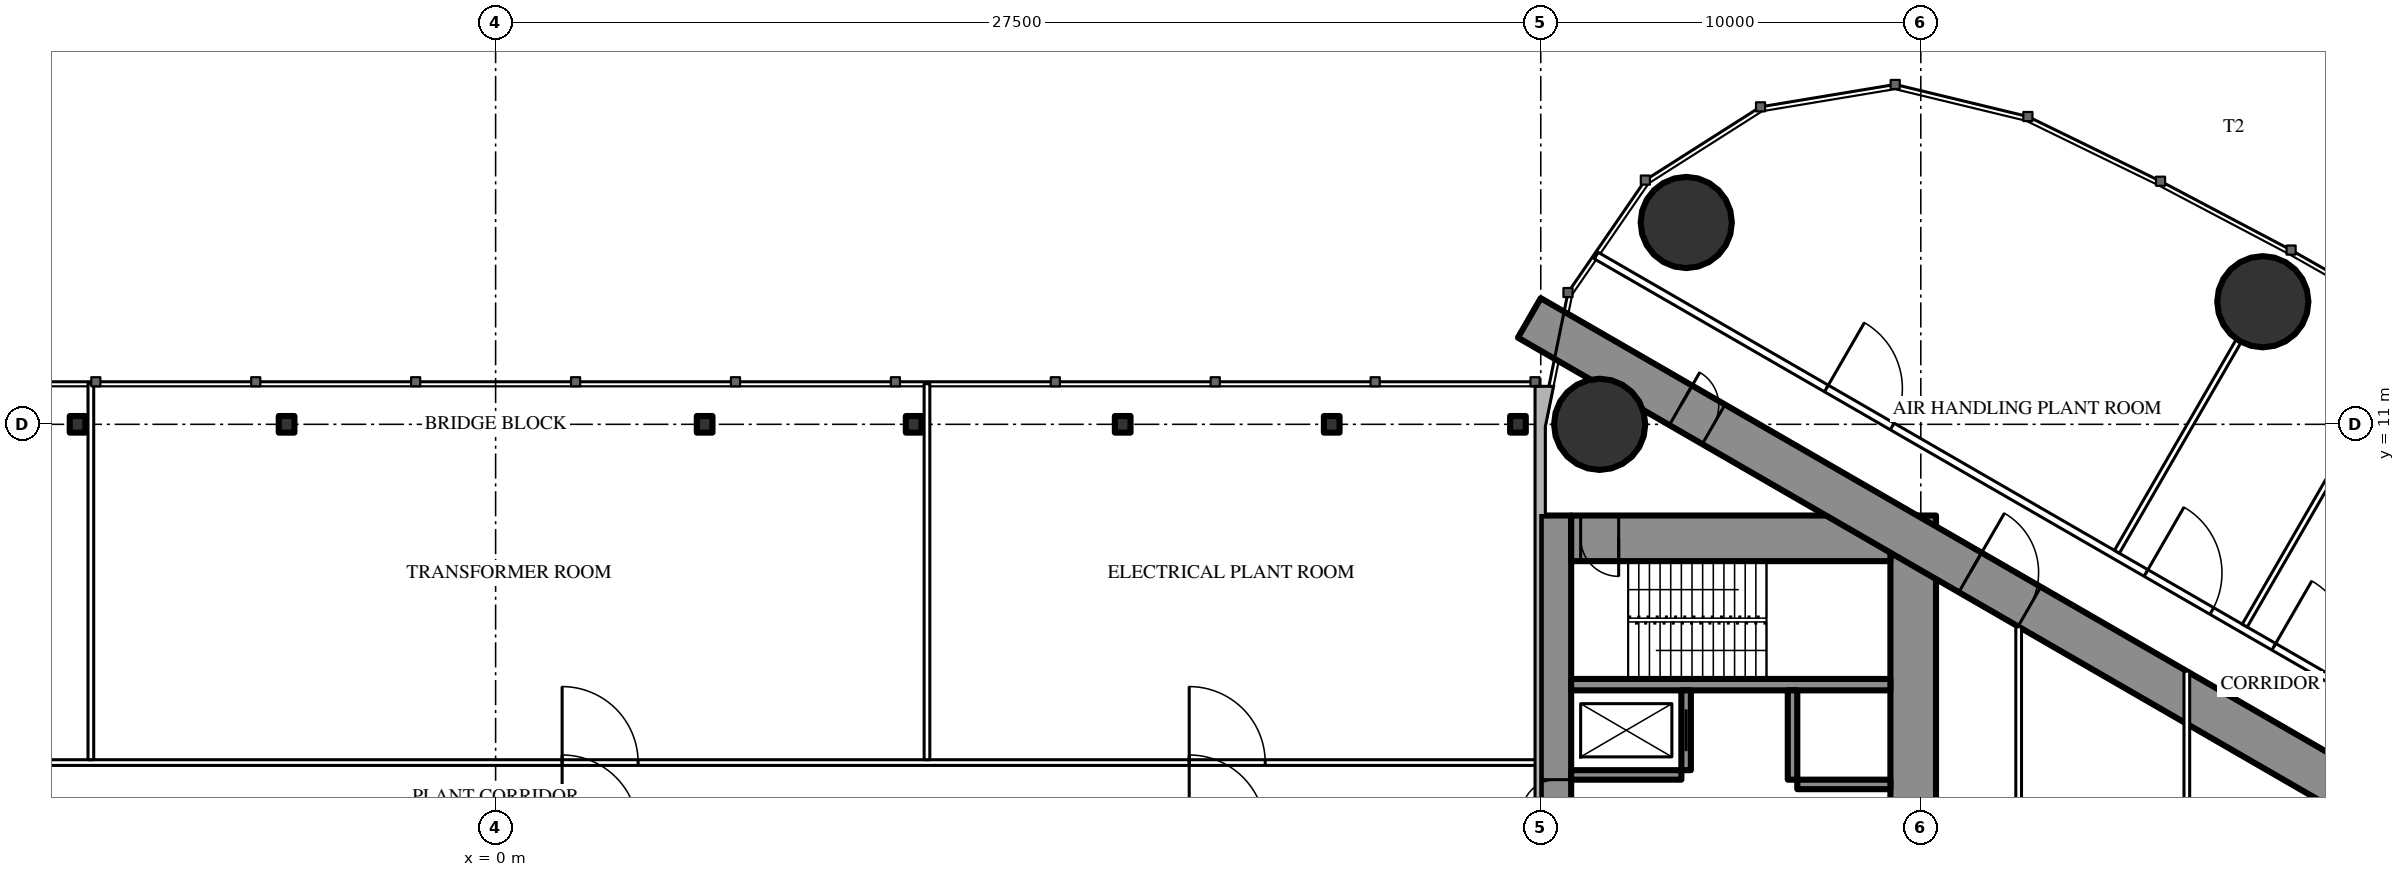
"""IFC4 building model, lengths in metres.
Left out: names, types, materials, properties, quantities, classifications, styles, units other than length and angle.
Written with IfcOpenShell. Run it as: python <this file> out.ifc"""

import sys

from ifc_helpers import new_model, si_unit, direction, frame, frame_2d, origin, origin_2d, place, context, subcontext, project, spatial, rectangle, circle, i_section, extrude, element, fill, save


model = new_model("IFC4")
c1 = context("Model", 3, precision=1e-05, world=origin(), true_north=direction((0.0, 1.0)))
c2 = subcontext(c1, "Body", "Model", "MODEL_VIEW")
j1 = project(units=[si_unit("LENGTHUNIT", "METRE"), si_unit("PLANEANGLEUNIT", "RADIAN")], contexts=[c1])
p1 = place(None, origin())
s1 = spatial("IfcSite", under=j1, at=p1, CompositionType="ELEMENT")
p2 = place(p1, origin())
s2 = spatial("IfcBuilding", under=s1, at=p2, CompositionType="ELEMENT")
p3 = place(p2, frame((0.0, 0.0, 263.3)))
s3 = spatial("IfcBuildingStorey", under=s2, at=p3, CompositionType="ELEMENT", Elevation=263.3)
for number, where, z_axis, x_axis in (
    (1, (31.328, 16.311, 0.0), (0.0, 0.0, 1.0), (1.0, 0.0, 0.0)),
    (2, (29.05, 11.0, 0.0), (0.0, 0.0, 1.0), (1.0, 0.0, 0.0)),
    (3, (46.499, 14.226, 0.0), (0.0, 0.0, 1.0), (1.0, 0.0, 0.0)),
):
    element("IfcColumn", number, at=place(p3, frame(where, z_axis=z_axis, x_axis=x_axis)), inside=s3, PredefinedType="COLUMN", context=c2, shape_type="SweptSolid", body=[
        extrude(circle(Radius=1.2, at=origin_2d()), origin(), (0.0, 0.0, 1.0), 5.0),
    ])
p4 = place(p3, frame((27.9, -8.6, 0.0), z_axis=(0.0, 0.0, 1.0), x_axis=(0.0, 1.0, 0.0)))
e4 = element("IfcWall", 4, at=p4, inside=s3, PredefinedType="SHEAR", context=c2, shape_type="SweptSolid", body=[
    extrude(rectangle(XDim=17.2, YDim=0.8, at=frame_2d((8.6, 0.0))), origin(), (0.0, 0.0, 1.0), 5.0),
])
p5 = place(p4, frame((9.35, 0.0, 0.0)))
e5 = element("IfcOpeningElement", 5, at=p5, cuts=e4, PredefinedType="OPENING", context=c2, shape_type="SweptSolid", body=[
    extrude(rectangle(XDim=0.9, YDim=2.2, at=frame_2d((0.45, 1.1))), frame((0.0, 0.41, 0.0), z_axis=(0.0, -1.0, 0.0), x_axis=(1.0, 0.0, 0.0)), (0.0, 0.0, 1.0), 0.82),
])
p6 = place(p3, frame((37.3, -8.6, 0.0), z_axis=(0.0, 0.0, 1.0), x_axis=(0.0, 1.0, 0.0)))
e6 = element("IfcWall", 6, at=p6, inside=s3, PredefinedType="SHEAR", context=c2, shape_type="SweptSolid", body=[
    extrude(rectangle(XDim=17.2, YDim=1.2, at=frame_2d((8.6, 0.0))), origin(), (0.0, 0.0, 1.0), 5.0),
])
p7 = place(p6, frame((7.7, 0.0, 0.0)))
e7 = element("IfcOpeningElement", 7, at=p7, cuts=e6, PredefinedType="OPENING", context=c2, shape_type="SweptSolid", body=[
    extrude(rectangle(XDim=1.8, YDim=2.2, at=frame_2d((0.9, 1.1))), frame((0.0, 0.61, 0.0), z_axis=(0.0, -1.0, 0.0), x_axis=(1.0, 0.0, 0.0)), (0.0, 0.0, 1.0), 1.22),
])
p8 = place(p3, frame((28.3, 8.0, 0.0), z_axis=(0.0, 0.0, 1.0), x_axis=(1.0, 0.0, 0.0)))
e8 = element("IfcWall", 8, at=p8, inside=s3, PredefinedType="SHEAR", context=c2, shape_type="SweptSolid", body=[
    extrude(rectangle(XDim=8.4, YDim=1.2, at=frame_2d((4.2, 0.0))), origin(), (0.0, 0.0, 1.0), 5.0),
])
p9 = place(p8, frame((0.25, 0.0, 0.0)))
e9 = element("IfcOpeningElement", 9, at=p9, cuts=e8, PredefinedType="OPENING", context=c2, shape_type="SweptSolid", body=[
    extrude(rectangle(XDim=1.0, YDim=2.2, at=frame_2d((0.5, 1.1))), frame((0.0, 0.61, 0.0), z_axis=(0.0, -1.0, 0.0), x_axis=(1.0, 0.0, 0.0)), (0.0, 0.0, 1.0), 1.22),
])
p10 = place(p3, frame((28.3, 4.15, 0.0), z_axis=(0.0, 0.0, 1.0), x_axis=(1.0, 0.0, 0.0)))
e10 = element("IfcWall", 10, at=p10, inside=s3, PredefinedType="SHEAR", context=c2, shape_type="SweptSolid", body=[
    extrude(rectangle(XDim=8.4, YDim=0.3, at=frame_2d((4.2, 0.0))), origin(), (0.0, 0.0, 1.0), 5.0),
])
p11 = place(p3, frame((31.325, 1.9, 0.0), z_axis=(0.0, 0.0, 1.0), x_axis=(0.0, 1.0, 0.0)))
e11 = element("IfcWall", 11, at=p11, inside=s3, PredefinedType="SHEAR", context=c2, shape_type="SweptSolid", body=[
    extrude(rectangle(XDim=2.1, YDim=0.25, at=frame_2d((1.05, 0.0))), origin(), (0.0, 0.0, 1.0), 5.0),
])
p12 = place(p11, frame((0.5, 0.0, 0.0)))
e12 = element("IfcOpeningElement", 12, at=p12, cuts=e11, PredefinedType="OPENING", context=c2, shape_type="SweptSolid", body=[
    extrude(rectangle(XDim=1.1, YDim=2.2, at=frame_2d((0.55, 1.1))), frame((0.0, 0.135, 0.0), z_axis=(0.0, -1.0, 0.0), x_axis=(1.0, 0.0, 0.0)), (0.0, 0.0, 1.0), 0.27),
])
p13 = place(p3, frame((34.125, 1.65, 0.0), z_axis=(0.0, 0.0, 1.0), x_axis=(0.0, 1.0, 0.0)))
e13 = element("IfcWall", 13, at=p13, inside=s3, PredefinedType="SHEAR", context=c2, shape_type="SweptSolid", body=[
    extrude(rectangle(XDim=2.35, YDim=0.25, at=frame_2d((1.175, 0.0))), origin(), (0.0, 0.0, 1.0), 5.0),
])
p14 = place(p3, frame((28.3, 1.775, 0.0), z_axis=(0.0, 0.0, 1.0), x_axis=(1.0, 0.0, 0.0)))
e14 = element("IfcWall", 14, at=p14, inside=s3, PredefinedType="SHEAR", context=c2, shape_type="SweptSolid", body=[
    extrude(rectangle(XDim=2.9, YDim=0.25, at=frame_2d((1.45, 0.0))), origin(), (0.0, 0.0, 1.0), 5.0),
])
p15 = place(p3, frame((34.25, 1.525, 0.0), z_axis=(0.0, 0.0, 1.0), x_axis=(1.0, 0.0, 0.0)))
e15 = element("IfcWall", 15, at=p15, inside=s3, PredefinedType="SHEAR", context=c2, shape_type="SweptSolid", body=[
    extrude(rectangle(XDim=2.45, YDim=0.25, at=frame_2d((1.225, 0.0))), origin(), (0.0, 0.0, 1.0), 5.0),
])
p16 = place(p3, frame((27.2, 13.8, 0.0), z_axis=(0.0, 0.0, 1.0), x_axis=(0.866024515034, -0.500001539357, 0.0)))
e16 = element("IfcWall", 16, at=p16, inside=s3, PredefinedType="SHEAR", context=c2, shape_type="SweptSolid", body=[
    extrude(rectangle(XDim=26.907, YDim=1.2, at=frame_2d((13.454, 0.0))), origin(), (0.0, 0.0, 1.0), 5.0),
])
p17 = place(p16, frame((4.6, 0.0, 0.0)))
e17 = element("IfcOpeningElement", 17, at=p17, cuts=e16, PredefinedType="OPENING", context=c2, shape_type="SweptSolid", body=[
    extrude(rectangle(XDim=1.0, YDim=2.2, at=frame_2d((0.5, 1.1))), frame((0.0, 0.61, 0.0), z_axis=(0.0, -1.0, 0.0), x_axis=(1.0, 0.0, 0.0)), (0.0, 0.0, 1.0), 1.22),
])
p18 = place(p16, frame((13.395, 0.0, 0.0)))
e18 = element("IfcOpeningElement", 18, at=p18, cuts=e16, PredefinedType="OPENING", context=c2, shape_type="SweptSolid", body=[
    extrude(rectangle(XDim=1.8, YDim=2.2, at=frame_2d((0.9, 1.1))), frame((0.0, 0.61, 0.0), z_axis=(0.0, -1.0, 0.0), x_axis=(1.0, 0.0, 0.0)), (0.0, 0.0, 1.0), 1.22),
])
for number, where, z_axis, x_axis in (
    (19, (-11.0, 11.0, 0.0), (0.0, 0.0, 1.0), (1.0, 0.0, 0.0)),
    (20, (-5.5, 11.0, 0.0), (0.0, 0.0, 1.0), (1.0, 0.0, 0.0)),
    (21, (0.0, 11.0, 0.0), (0.0, 0.0, 1.0), (1.0, 0.0, 0.0)),
    (22, (5.5, 11.0, 0.0), (0.0, 0.0, 1.0), (1.0, 0.0, 0.0)),
    (23, (11.0, 11.0, 0.0), (0.0, 0.0, 1.0), (1.0, 0.0, 0.0)),
    (24, (16.5, 11.0, 0.0), (0.0, 0.0, 1.0), (1.0, 0.0, 0.0)),
    (25, (22.0, 11.0, 0.0), (0.0, 0.0, 1.0), (1.0, 0.0, 0.0)),
    (26, (26.9, 11.0, 0.0), (0.0, 0.0, 1.0), (1.0, 0.0, 0.0)),
):
    element("IfcColumn", number, at=place(p3, frame(where, z_axis=z_axis, x_axis=x_axis)), inside=s3, PredefinedType="COLUMN", context=c2, shape_type="SweptSolid", body=[
        extrude(i_section(OverallWidth=0.412, OverallDepth=0.437, WebThickness=0.036, FlangeThickness=0.058, FilletRadius=0.015, at=origin_2d()), origin(), (0.0, 0.0, 1.0), 5.0),
    ])
p19 = place(p3, frame((28.959, 15.44, 0.0), z_axis=(0.0, 0.0, 1.0), x_axis=(0.866027378611, -0.499996579484, 0.0)))
e27 = element("IfcWall", 27, at=p19, inside=s3, PredefinedType="PARTITIONING", context=c2, shape_type="SweptSolid", body=[
    extrude(rectangle(XDim=30.76, YDim=0.2, at=frame_2d((15.38, 0.0))), origin(), (0.0, 0.0, 1.0), 4.75),
])
p20 = place(p19, frame((26.032, 0.0, 0.0)))
e28 = element("IfcOpeningElement", 28, at=p20, cuts=e27, PredefinedType="OPENING", context=c2, shape_type="SweptSolid", body=[
    extrude(rectangle(XDim=2.0, YDim=2.4, at=frame_2d((1.0, 1.2))), frame((0.0, 0.11, 0.0), z_axis=(0.0, -1.0, 0.0), x_axis=(1.0, 0.0, 0.0)), (0.0, 0.0, 1.0), 0.22),
])
p21 = place(p19, frame((20.587, 0.0, 0.0)))
e29 = element("IfcOpeningElement", 29, at=p21, cuts=e27, PredefinedType="OPENING", context=c2, shape_type="SweptSolid", body=[
    extrude(rectangle(XDim=2.0, YDim=2.4, at=frame_2d((1.0, 1.2))), frame((0.0, 0.11, 0.0), z_axis=(0.0, -1.0, 0.0), x_axis=(1.0, 0.0, 0.0)), (0.0, 0.0, 1.0), 0.22),
])
p22 = place(p19, frame((16.704, 0.0, 0.0)))
e30 = element("IfcOpeningElement", 30, at=p22, cuts=e27, PredefinedType="OPENING", context=c2, shape_type="SweptSolid", body=[
    extrude(rectangle(XDim=2.0, YDim=2.4, at=frame_2d((1.0, 1.2))), frame((0.0, 0.11, 0.0), z_axis=(0.0, -1.0, 0.0), x_axis=(1.0, 0.0, 0.0)), (0.0, 0.0, 1.0), 0.22),
])
p23 = place(p19, frame((6.994, 0.0, 0.0)))
e31 = element("IfcOpeningElement", 31, at=p23, cuts=e27, PredefinedType="OPENING", context=c2, shape_type="SweptSolid", body=[
    extrude(rectangle(XDim=2.0, YDim=2.4, at=frame_2d((1.0, 1.2))), frame((0.0, 0.11, 0.0), z_axis=(0.0, -1.0, 0.0), x_axis=(1.0, 0.0, 0.0)), (0.0, 0.0, 1.0), 0.22),
])
p24 = place(p3, frame((42.66, 7.646, 0.0), z_axis=(0.0, 0.0, 1.0), x_axis=(0.499996592859, 0.866027370889, 0.0)))
e32 = element("IfcWall", 32, at=p24, inside=s3, PredefinedType="PARTITIONING", context=c2, shape_type="SweptSolid", body=[
    extrude(rectangle(XDim=6.398, YDim=0.15, at=frame_2d((3.199, 0.0))), origin(), (0.0, 0.0, 1.0), 3.85),
])
p25 = place(p3, frame((46.023, 5.704, 0.0), z_axis=(0.0, 0.0, 1.0), x_axis=(0.499984478165, 0.866034365135, 0.0)))
e33 = element("IfcWall", 33, at=p25, inside=s3, PredefinedType="PARTITIONING", context=c2, shape_type="SweptSolid", body=[
    extrude(rectangle(XDim=6.426, YDim=0.15, at=frame_2d((3.213, 0.0))), origin(), (0.0, 0.0, 1.0), 3.85),
])
p26 = place(p3, frame((40.075, -5.674, 0.0), z_axis=(0.0, 0.0, 1.0), x_axis=(0.0, 1.0, 0.0)))
e34 = element("IfcWall", 34, at=p26, inside=s3, PredefinedType="PARTITIONING", context=c2, shape_type="SweptSolid", body=[
    extrude(rectangle(XDim=11.348, YDim=0.15, at=frame_2d((5.674, 0.0))), origin(), (0.0, 0.0, 1.0), 4.75),
])
p27 = place(p26, frame((4.774, 0.0, 0.0)))
e35 = element("IfcOpeningElement", 35, at=p27, cuts=e34, PredefinedType="OPENING", context=c2, shape_type="SweptSolid", body=[
    extrude(rectangle(XDim=1.8, YDim=2.2, at=frame_2d((0.9, 1.1))), frame((0.0, 0.085, 0.0), z_axis=(0.0, -1.0, 0.0), x_axis=(1.0, 0.0, 0.0)), (0.0, 0.0, 1.0), 0.17),
])
p28 = place(p3, frame((44.5, -4.505, 0.0), z_axis=(0.0, 0.0, 1.0), x_axis=(0.0, 1.0, 0.0)))
e36 = element("IfcWall", 36, at=p28, inside=s3, PredefinedType="PARTITIONING", context=c2, shape_type="SweptSolid", body=[
    extrude(rectangle(XDim=9.009, YDim=0.15, at=frame_2d((4.505, 0.0))), origin(), (0.0, 0.0, 1.0), 4.75),
])
p29 = place(p28, frame((4.005, 0.0, 0.0)))
e37 = element("IfcOpeningElement", 37, at=p29, cuts=e36, PredefinedType="OPENING", context=c2, shape_type="SweptSolid", body=[
    extrude(rectangle(XDim=1.0, YDim=2.2, at=frame_2d((0.5, 1.1))), frame((0.0, 0.085, 0.0), z_axis=(0.0, -1.0, 0.0), x_axis=(1.0, 0.0, 0.0)), (0.0, 0.0, 1.0), 0.17),
])
p30 = place(p3, frame((-27.5, 2.1, 0.0), z_axis=(0.0, 0.0, 1.0), x_axis=(1.0, 0.0, 0.0)))
e38 = element("IfcWall", 38, at=p30, inside=s3, PredefinedType="PARTITIONING", context=c2, shape_type="SweptSolid", body=[
    extrude(rectangle(XDim=55.0, YDim=0.15, at=frame_2d((27.5, 0.0))), origin(), (0.0, 0.0, 1.0), 4.8),
])
p31 = place(p30, frame((7.25, 0.0, 0.0)))
e39 = element("IfcOpeningElement", 39, at=p31, cuts=e38, PredefinedType="OPENING", context=c2, shape_type="SweptSolid", body=[
    extrude(rectangle(XDim=2.0, YDim=2.4, at=frame_2d((1.0, 1.2))), frame((0.0, 0.085, 0.0), z_axis=(0.0, -1.0, 0.0), x_axis=(1.0, 0.0, 0.0)), (0.0, 0.0, 1.0), 0.17),
])
p32 = place(p30, frame((29.25, 0.0, 0.0)))
e40 = element("IfcOpeningElement", 40, at=p32, cuts=e38, PredefinedType="OPENING", context=c2, shape_type="SweptSolid", body=[
    extrude(rectangle(XDim=2.0, YDim=2.4, at=frame_2d((1.0, 1.2))), frame((0.0, 0.085, 0.0), z_axis=(0.0, -1.0, 0.0), x_axis=(1.0, 0.0, 0.0)), (0.0, 0.0, 1.0), 0.17),
])
p33 = place(p30, frame((45.75, 0.0, 0.0)))
e41 = element("IfcOpeningElement", 41, at=p33, cuts=e38, PredefinedType="OPENING", context=c2, shape_type="SweptSolid", body=[
    extrude(rectangle(XDim=2.0, YDim=2.4, at=frame_2d((1.0, 1.2))), frame((0.0, 0.085, 0.0), z_axis=(0.0, -1.0, 0.0), x_axis=(1.0, 0.0, 0.0)), (0.0, 0.0, 1.0), 0.17),
])
for number, where, z_axis, x_axis in (
    (42, (-10.65, 2.175, 0.0), (0.0, 0.0, 1.0), (0.0, 1.0, 0.0)),
    (43, (11.35, 2.175, 0.0), (0.0, 0.0, 1.0), (0.0, 1.0, 0.0)),
):
    element("IfcWall", number, at=place(p3, frame(where, z_axis=z_axis, x_axis=x_axis)), inside=s3, PredefinedType="PARTITIONING", context=c2, shape_type="SweptSolid", body=[
        extrude(rectangle(XDim=9.895, YDim=0.15, at=frame_2d((4.948, 0.0))), origin(), (0.0, 0.0, 1.0), 4.8),
    ])
p34 = place(p21, origin())
e44 = element("IfcDoor", 44, at=p34, inside=s3, OperationType="DOUBLE_DOOR_SINGLE_SWING", PredefinedType="DOOR", context=c2, shape_type="SweptSolid", body=[
    extrude(rectangle(XDim=2.0, YDim=2.4, at=frame_2d((1.0, 1.2))), frame((0.0, 0.025, 0.0), z_axis=(0.0, -1.0, 0.0), x_axis=(1.0, 0.0, 0.0)), (0.0, 0.0, 1.0), 0.05),
])
fill(e29, e44)
p35 = place(p22, origin())
e45 = element("IfcDoor", 45, at=p35, inside=s3, OperationType="DOUBLE_DOOR_SINGLE_SWING", PredefinedType="DOOR", context=c2, shape_type="SweptSolid", body=[
    extrude(rectangle(XDim=2.0, YDim=2.4, at=frame_2d((1.0, 1.2))), frame((0.0, 0.025, 0.0), z_axis=(0.0, -1.0, 0.0), x_axis=(1.0, 0.0, 0.0)), (0.0, 0.0, 1.0), 0.05),
])
fill(e30, e45)
p36 = place(p23, origin())
e46 = element("IfcDoor", 46, at=p36, inside=s3, OperationType="DOUBLE_DOOR_SINGLE_SWING", PredefinedType="DOOR", context=c2, shape_type="SweptSolid", body=[
    extrude(rectangle(XDim=2.0, YDim=2.4, at=frame_2d((1.0, 1.2))), frame((0.0, 0.025, 0.0), z_axis=(0.0, -1.0, 0.0), x_axis=(1.0, 0.0, 0.0)), (0.0, 0.0, 1.0), 0.05),
])
fill(e31, e46)
p37 = place(p17, origin())
e47 = element("IfcDoor", 47, at=p37, inside=s3, OperationType="SINGLE_SWING_LEFT", PredefinedType="DOOR", context=c2, shape_type="SweptSolid", body=[
    extrude(rectangle(XDim=1.0, YDim=2.2, at=frame_2d((0.5, 1.1))), frame((0.0, 0.025, 0.0), z_axis=(0.0, -1.0, 0.0), x_axis=(1.0, 0.0, 0.0)), (0.0, 0.0, 1.0), 0.05),
])
fill(e17, e47)
p38 = place(p18, origin())
e48 = element("IfcDoor", 48, at=p38, inside=s3, OperationType="DOUBLE_DOOR_SINGLE_SWING", PredefinedType="DOOR", context=c2, shape_type="SweptSolid", body=[
    extrude(rectangle(XDim=1.8, YDim=2.2, at=frame_2d((0.9, 1.1))), frame((0.0, 0.025, 0.0), z_axis=(0.0, -1.0, 0.0), x_axis=(1.0, 0.0, 0.0)), (0.0, 0.0, 1.0), 0.05),
])
fill(e18, e48)
p39 = place(p9, origin())
e49 = element("IfcDoor", 49, at=p39, inside=s3, OperationType="SINGLE_SWING_RIGHT", PredefinedType="DOOR", context=c2, shape_type="SweptSolid", body=[
    extrude(rectangle(XDim=1.0, YDim=2.2, at=frame_2d((0.5, 1.1))), frame((0.0, 0.025, 0.0), z_axis=(0.0, -1.0, 0.0), x_axis=(1.0, 0.0, 0.0)), (0.0, 0.0, 1.0), 0.05),
])
fill(e9, e49)
p40 = place(p5, origin())
e50 = element("IfcDoor", 50, at=p40, inside=s3, OperationType="SINGLE_SWING_LEFT", PredefinedType="DOOR", context=c2, shape_type="SweptSolid", body=[
    extrude(rectangle(XDim=0.9, YDim=2.2, at=frame_2d((0.45, 1.1))), frame((0.0, 0.025, 0.0), z_axis=(0.0, -1.0, 0.0), x_axis=(1.0, 0.0, 0.0)), (0.0, 0.0, 1.0), 0.05),
])
fill(e5, e50)
p41 = place(p32, origin())
e51 = element("IfcDoor", 51, at=p41, inside=s3, OperationType="DOUBLE_DOOR_SINGLE_SWING", PredefinedType="DOOR", context=c2, shape_type="SweptSolid", body=[
    extrude(rectangle(XDim=2.0, YDim=2.4, at=frame_2d((1.0, 1.2))), frame((0.0, 0.025, 0.0), z_axis=(0.0, -1.0, 0.0), x_axis=(1.0, 0.0, 0.0)), (0.0, 0.0, 1.0), 0.05),
])
fill(e40, e51)
p42 = place(p33, origin())
e52 = element("IfcDoor", 52, at=p42, inside=s3, OperationType="DOUBLE_DOOR_SINGLE_SWING", PredefinedType="DOOR", context=c2, shape_type="SweptSolid", body=[
    extrude(rectangle(XDim=2.0, YDim=2.4, at=frame_2d((1.0, 1.2))), frame((0.0, 0.025, 0.0), z_axis=(0.0, -1.0, 0.0), x_axis=(1.0, 0.0, 0.0)), (0.0, 0.0, 1.0), 0.05),
])
fill(e41, e52)
p43 = place(p12, origin())
e53 = element("IfcDoor", 53, at=p43, inside=s3, OperationType="SLIDING_TO_LEFT", PredefinedType="USERDEFINED", context=c2, shape_type="SweptSolid", body=[
    extrude(rectangle(XDim=1.1, YDim=2.2, at=frame_2d((0.55, 1.1))), frame((0.0, 0.025, 0.0), z_axis=(0.0, -1.0, 0.0), x_axis=(1.0, 0.0, 0.0)), (0.0, 0.0, 1.0), 0.05),
])
fill(e12, e53)
save(model, sys.argv[1])
